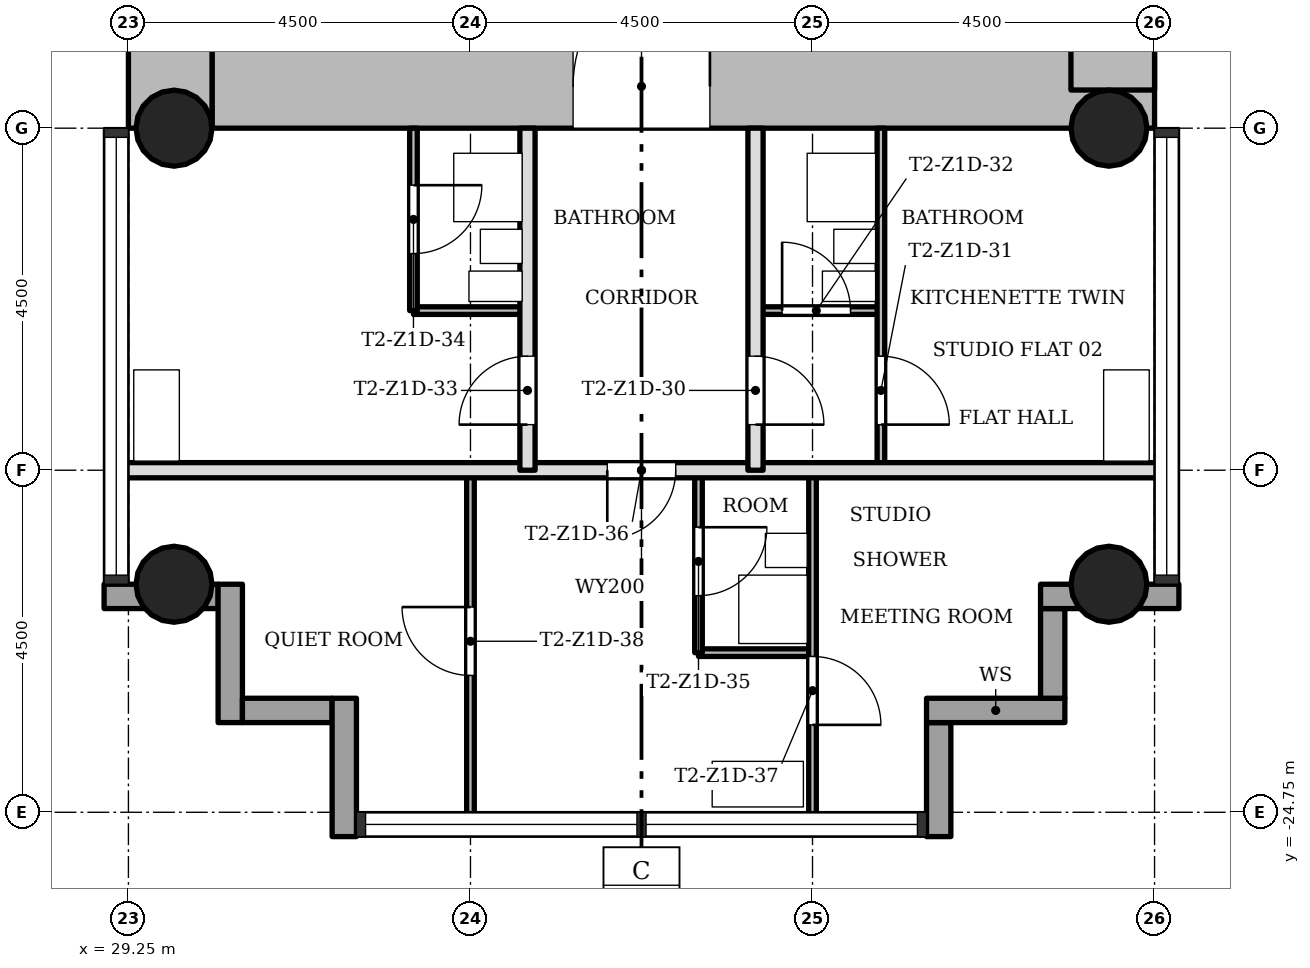
"""IFC4 building model, lengths in metres.
Left out: names, types, materials, properties, quantities, classifications, styles, units other than length and angle.
Written with IfcOpenShell. Run it as: python <this file> out.ifc"""

import sys

from ifc_helpers import new_model, si_unit, direction, frame, frame_2d, origin, origin_2d, place, context, subcontext, project, spatial, rectangle, hollow_circle, extrude, element, fill, save


model = new_model("IFC4")
c1 = context("Model", 3, precision=1e-05, world=origin(), true_north=direction((0.0, 1.0)))
c2 = subcontext(c1, "Body", "Model", "MODEL_VIEW")
j1 = project(units=[si_unit("LENGTHUNIT", "METRE"), si_unit("PLANEANGLEUNIT", "RADIAN")], contexts=[c1])
p1 = place(None, origin())
s1 = spatial("IfcSite", under=j1, at=p1, CompositionType="ELEMENT")
p2 = place(p1, origin())
s2 = spatial("IfcBuilding", under=s1, at=p2, CompositionType="ELEMENT")
p3 = place(p2, frame((0.0, 0.0, 61.9)))
s3 = spatial("IfcBuildingStorey", under=s2, at=p3, CompositionType="ELEMENT", Elevation=61.9)
p4 = place(p3, frame((30.35, -15.2, 0.0), z_axis=(0.0, 0.0, 1.0), x_axis=(1.0, 0.0, 0.0)))
e1 = element("IfcWall", 1, at=p4, inside=s3, PredefinedType="SHEAR", context=c2, shape_type="SweptSolid", body=[
    extrude(rectangle(XDim=12.4, YDim=1.1, at=frame_2d((6.2, 0.0))), origin(), (0.0, 0.0, 1.0), 3.4),
])
p5 = place(p4, frame((4.75, 0.0, 0.0)))
e2 = element("IfcOpeningElement", 2, at=p5, cuts=e1, PredefinedType="OPENING", context=c2, shape_type="SweptSolid", body=[
    extrude(rectangle(XDim=1.8, YDim=2.1, at=frame_2d((0.9, 1.05))), frame((0.0, 0.56, 0.0), z_axis=(0.0, -1.0, 0.0), x_axis=(1.0, 0.0, 0.0)), (0.0, 0.0, 1.0), 1.12),
])
p6 = place(p3, frame((42.2, -15.248, 0.0), z_axis=(0.0, 0.0, 1.0), x_axis=(0.0, 1.0, 0.0)))
e3 = element("IfcWall", 3, at=p6, inside=s3, PredefinedType="SHEAR", context=c2, shape_type="SweptSolid", body=[
    extrude(rectangle(XDim=8.596, YDim=1.1, at=frame_2d((4.298, 0.0))), origin(), (0.0, 0.0, 1.0), 3.4),
])
p7 = place(p3, frame((29.8, -7.85, 0.0), z_axis=(0.0, 0.0, 1.0), x_axis=(0.0, -1.0, 0.0)))
e4 = element("IfcWall", 4, at=p7, inside=s3, PredefinedType="SHEAR", context=c2, shape_type="SweptSolid", body=[
    extrude(rectangle(XDim=7.9, YDim=1.1, at=frame_2d((3.95, 0.0))), origin(), (0.0, 0.0, 1.0), 3.4),
])
for number, where, z_axis, x_axis in (
    (5, (42.15, -15.75, 0.0), (0.0, 0.0, 1.0), (1.0, 0.0, 0.0)),
    (6, (29.85, -15.75, 0.0), (0.0, 0.0, 1.0), (1.0, 0.0, 0.0)),
    (7, (42.15, -21.75, 0.0), (0.0, 0.0, 1.0), (1.0, 0.0, 0.0)),
    (8, (29.85, -21.75, 0.0), (0.0, 0.0, 1.0), (1.0, 0.0, 0.0)),
):
    element("IfcColumn", number, at=place(p3, frame(where, z_axis=z_axis, x_axis=x_axis)), inside=s3, PredefinedType="COLUMN", context=c2, shape_type="SweptSolid", body=[
        extrude(hollow_circle(Radius=0.5, WallThickness=0.036, at=origin_2d()), origin(), (0.0, 0.0, 1.0), 3.4),
    ])
p8 = place(p3, frame((39.91, -25.07, -0.3), z_axis=(0.0, 0.0, 1.0), x_axis=(0.0, 1.0, 0.0)))
e9 = element("IfcWall", 9, at=p8, inside=s3, PredefinedType="STANDARD", context=c2, shape_type="SweptSolid", body=[
    extrude(rectangle(XDim=1.5, YDim=0.32, at=frame_2d((0.75, 0.0))), origin(), (0.0, 0.0, 1.0), 3.4),
])
p9 = place(p3, frame((39.75, -23.41, -0.3), z_axis=(0.0, 0.0, 1.0), x_axis=(1.0, 0.0, 0.0)))
e10 = element("IfcWall", 10, at=p9, inside=s3, PredefinedType="STANDARD", context=c2, shape_type="SweptSolid", body=[
    extrude(rectangle(XDim=1.82, YDim=0.32, at=frame_2d((0.91, 0.0))), origin(), (0.0, 0.0, 1.0), 3.4),
])
p10 = place(p3, frame((41.41, -23.25, -0.3), z_axis=(0.0, 0.0, 1.0), x_axis=(0.0, 1.0, 0.0)))
e11 = element("IfcWall", 11, at=p10, inside=s3, PredefinedType="STANDARD", context=c2, shape_type="SweptSolid", body=[
    extrude(rectangle(XDim=1.18, YDim=0.32, at=frame_2d((0.59, 0.0))), origin(), (0.0, 0.0, 1.0), 3.4),
])
p11 = place(p3, frame((41.25, -21.91, -0.3), z_axis=(0.0, 0.0, 1.0), x_axis=(1.0, 0.0, 0.0)))
e12 = element("IfcWall", 12, at=p11, inside=s3, PredefinedType="STANDARD", context=c2, shape_type="SweptSolid", body=[
    extrude(rectangle(XDim=1.82, YDim=0.32, at=frame_2d((0.91, 0.0))), origin(), (0.0, 0.0, 1.0), 3.4),
])
p12 = place(p3, frame((28.93, -21.91, -0.3), z_axis=(0.0, 0.0, 1.0), x_axis=(1.0, 0.0, 0.0)))
e13 = element("IfcWall", 13, at=p12, inside=s3, PredefinedType="STANDARD", context=c2, shape_type="SweptSolid", body=[
    extrude(rectangle(XDim=1.5, YDim=0.32, at=frame_2d((0.75, 0.0))), origin(), (0.0, 0.0, 1.0), 3.4),
])
p13 = place(p3, frame((30.59, -21.75, -0.3), z_axis=(0.0, 0.0, 1.0), x_axis=(0.0, -1.0, 0.0)))
e14 = element("IfcWall", 14, at=p13, inside=s3, PredefinedType="STANDARD", context=c2, shape_type="SweptSolid", body=[
    extrude(rectangle(XDim=1.82, YDim=0.32, at=frame_2d((0.91, 0.0))), origin(), (0.0, 0.0, 1.0), 3.4),
])
p14 = place(p3, frame((30.75, -23.41, -0.3), z_axis=(0.0, 0.0, 1.0), x_axis=(1.0, 0.0, 0.0)))
e15 = element("IfcWall", 15, at=p14, inside=s3, PredefinedType="STANDARD", context=c2, shape_type="SweptSolid", body=[
    extrude(rectangle(XDim=1.18, YDim=0.32, at=frame_2d((0.59, 0.0))), origin(), (0.0, 0.0, 1.0), 3.4),
])
p15 = place(p3, frame((32.09, -23.25, -0.3), z_axis=(0.0, 0.0, 1.0), x_axis=(0.0, -1.0, 0.0)))
e16 = element("IfcWall", 16, at=p15, inside=s3, PredefinedType="STANDARD", context=c2, shape_type="SweptSolid", body=[
    extrude(rectangle(XDim=1.82, YDim=0.32, at=frame_2d((0.91, 0.0))), origin(), (0.0, 0.0, 1.0), 3.4),
])
p16 = place(p3, frame((38.25, -22.65, 0.0), z_axis=(0.0, 0.0, 1.0), x_axis=(-1.0, 0.0, 0.0)))
e17 = element("IfcWall", 17, at=p16, inside=s3, PredefinedType="PARTITIONING", context=c2, shape_type="SweptSolid", body=[
    extrude(rectangle(XDim=1.5, YDim=0.1, at=frame_2d((0.75, 0.0))), origin(), (0.0, 0.0, 1.0), 3.0),
])
p17 = place(p3, frame((42.85, -20.25, 0.0), z_axis=(0.0, 0.0, 1.0), x_axis=(-1.0, 0.0, 0.0)))
e18 = element("IfcWall", 18, at=p17, inside=s3, PredefinedType="SOLIDWALL", context=c2, shape_type="SweptSolid", body=[
    extrude(rectangle(XDim=13.7, YDim=0.2, at=frame_2d((6.85, 0.0))), origin(), (0.0, 0.0, 1.0), 3.0),
])
p18 = place(p17, frame((6.4, 0.0, 0.0)))
e19 = element("IfcOpeningElement", 19, at=p18, cuts=e18, PredefinedType="OPENING", context=c2, shape_type="SweptSolid", body=[
    extrude(rectangle(XDim=0.9, YDim=2.1, at=frame_2d((0.45, 1.05))), frame((0.0, 0.11, 0.0), z_axis=(0.0, -1.0, 0.0), x_axis=(1.0, 0.0, 0.0)), (0.0, 0.0, 1.0), 0.22),
])
p19 = place(p3, frame((39.15, -18.15, 0.0), z_axis=(0.0, 0.0, 1.0), x_axis=(-1.0, 0.0, 0.0)))
e20 = element("IfcWall", 20, at=p19, inside=s3, PredefinedType="PARTITIONING", context=c2, shape_type="SweptSolid", body=[
    extrude(rectangle(XDim=1.65, YDim=0.1, at=frame_2d((0.825, 0.0))), origin(), (0.0, 0.0, 1.0), 3.0),
])
p20 = place(p19, frame((0.4, 0.0, 0.0)))
e21 = element("IfcOpeningElement", 21, at=p20, cuts=e20, PredefinedType="OPENING", context=c2, shape_type="SweptSolid", body=[
    extrude(rectangle(XDim=0.9, YDim=2.1, at=frame_2d((0.45, 1.05))), frame((0.0, 0.06, 0.0), z_axis=(0.0, -1.0, 0.0), x_axis=(1.0, 0.0, 0.0)), (0.0, 0.0, 1.0), 0.12),
])
p21 = place(p3, frame((34.5, -18.15, 0.0), z_axis=(0.0, 0.0, 1.0), x_axis=(-1.0, 0.0, 0.0)))
e22 = element("IfcWall", 22, at=p21, inside=s3, PredefinedType="PARTITIONING", context=c2, shape_type="SweptSolid", body=[
    extrude(rectangle(XDim=1.5, YDim=0.1, at=frame_2d((0.75, 0.0))), origin(), (0.0, 0.0, 1.0), 3.0),
])
p22 = place(p3, frame((39.15, -20.25, 0.0), z_axis=(0.0, 0.0, 1.0), x_axis=(0.0, 1.0, 0.0)))
e23 = element("IfcWall", 23, at=p22, inside=s3, PredefinedType="PARTITIONING", context=c2, shape_type="SweptSolid", body=[
    extrude(rectangle(XDim=4.5, YDim=0.1, at=frame_2d((2.25, 0.0))), origin(), (0.0, 0.0, 1.0), 3.0),
])
p23 = place(p22, frame((0.6, 0.0, 0.0)))
e24 = element("IfcOpeningElement", 24, at=p23, cuts=e23, PredefinedType="OPENING", context=c2, shape_type="SweptSolid", body=[
    extrude(rectangle(XDim=0.9, YDim=2.1, at=frame_2d((0.45, 1.05))), frame((0.0, 0.06, 0.0), z_axis=(0.0, -1.0, 0.0), x_axis=(1.0, 0.0, 0.0)), (0.0, 0.0, 1.0), 0.12),
])
p24 = place(p3, frame((38.25, -24.85, 0.0), z_axis=(0.0, 0.0, 1.0), x_axis=(0.0, 1.0, 0.0)))
e25 = element("IfcWall", 25, at=p24, inside=s3, PredefinedType="PARTITIONING", context=c2, shape_type="SweptSolid", body=[
    extrude(rectangle(XDim=4.6, YDim=0.1, at=frame_2d((2.3, 0.0))), origin(), (0.0, 0.0, 1.0), 3.0),
])
p25 = place(p24, frame((1.25, 0.0, 0.0)))
e26 = element("IfcOpeningElement", 26, at=p25, cuts=e25, PredefinedType="OPENING", context=c2, shape_type="SweptSolid", body=[
    extrude(rectangle(XDim=0.9, YDim=2.1, at=frame_2d((0.45, 1.05))), frame((0.0, 0.06, 0.0), z_axis=(0.0, -1.0, 0.0), x_axis=(1.0, 0.0, 0.0)), (0.0, 0.0, 1.0), 0.12),
])
p26 = place(p3, frame((37.5, -20.25, 0.0), z_axis=(0.0, 0.0, 1.0), x_axis=(0.0, 1.0, 0.0)))
e27 = element("IfcWall", 27, at=p26, inside=s3, PredefinedType="SOLIDWALL", context=c2, shape_type="SweptSolid", body=[
    extrude(rectangle(XDim=4.5, YDim=0.2, at=frame_2d((2.25, 0.0))), origin(), (0.0, 0.0, 1.0), 3.0),
])
p27 = place(p26, frame((0.6, 0.0, 0.0)))
e28 = element("IfcOpeningElement", 28, at=p27, cuts=e27, PredefinedType="OPENING", context=c2, shape_type="SweptSolid", body=[
    extrude(rectangle(XDim=0.9, YDim=2.1, at=frame_2d((0.45, 1.05))), frame((0.0, 0.11, 0.0), z_axis=(0.0, -1.0, 0.0), x_axis=(1.0, 0.0, 0.0)), (0.0, 0.0, 1.0), 0.22),
])
p28 = place(p3, frame((36.75, -22.65, 0.0), z_axis=(0.0, 0.0, 1.0), x_axis=(0.0, 1.0, 0.0)))
e29 = element("IfcWall", 29, at=p28, inside=s3, PredefinedType="PARTITIONING", context=c2, shape_type="SweptSolid", body=[
    extrude(rectangle(XDim=2.4, YDim=0.1, at=frame_2d((1.2, 0.0))), origin(), (0.0, 0.0, 1.0), 3.0),
])
p29 = place(p28, frame((0.75, 0.0, 0.0)))
e30 = element("IfcOpeningElement", 30, at=p29, cuts=e29, PredefinedType="OPENING", context=c2, shape_type="SweptSolid", body=[
    extrude(rectangle(XDim=0.9, YDim=2.1, at=frame_2d((0.45, 1.05))), frame((0.0, 0.06, 0.0), z_axis=(0.0, -1.0, 0.0), x_axis=(1.0, 0.0, 0.0)), (0.0, 0.0, 1.0), 0.12),
])
p30 = place(p3, frame((34.5, -20.25, 0.0), z_axis=(0.0, 0.0, 1.0), x_axis=(0.0, 1.0, 0.0)))
e31 = element("IfcWall", 31, at=p30, inside=s3, PredefinedType="SOLIDWALL", context=c2, shape_type="SweptSolid", body=[
    extrude(rectangle(XDim=4.5, YDim=0.2, at=frame_2d((2.25, 0.0))), origin(), (0.0, 0.0, 1.0), 3.0),
])
p31 = place(p30, frame((0.6, 0.0, 0.0)))
e32 = element("IfcOpeningElement", 32, at=p31, cuts=e31, PredefinedType="OPENING", context=c2, shape_type="SweptSolid", body=[
    extrude(rectangle(XDim=0.9, YDim=2.1, at=frame_2d((0.45, 1.05))), frame((0.0, 0.11, 0.0), z_axis=(0.0, -1.0, 0.0), x_axis=(1.0, 0.0, 0.0)), (0.0, 0.0, 1.0), 0.22),
])
p32 = place(p3, frame((33.75, -24.85, 0.0), z_axis=(0.0, 0.0, 1.0), x_axis=(0.0, 1.0, 0.0)))
e33 = element("IfcWall", 33, at=p32, inside=s3, PredefinedType="PARTITIONING", context=c2, shape_type="SweptSolid", body=[
    extrude(rectangle(XDim=4.6, YDim=0.1, at=frame_2d((2.3, 0.0))), origin(), (0.0, 0.0, 1.0), 3.0),
])
p33 = place(p32, frame((1.9, 0.0, 0.0)))
e34 = element("IfcOpeningElement", 34, at=p33, cuts=e33, PredefinedType="OPENING", context=c2, shape_type="SweptSolid", body=[
    extrude(rectangle(XDim=0.9, YDim=2.1, at=frame_2d((0.45, 1.05))), frame((0.0, 0.06, 0.0), z_axis=(0.0, -1.0, 0.0), x_axis=(1.0, 0.0, 0.0)), (0.0, 0.0, 1.0), 0.12),
])
p34 = place(p3, frame((33.0, -18.15, 0.0), z_axis=(0.0, 0.0, 1.0), x_axis=(0.0, 1.0, 0.0)))
e35 = element("IfcWall", 35, at=p34, inside=s3, PredefinedType="PARTITIONING", context=c2, shape_type="SweptSolid", body=[
    extrude(rectangle(XDim=2.4, YDim=0.1, at=frame_2d((1.2, 0.0))), origin(), (0.0, 0.0, 1.0), 3.0),
])
p35 = place(p34, frame((0.75, 0.0, 0.0)))
e36 = element("IfcOpeningElement", 36, at=p35, cuts=e35, PredefinedType="OPENING", context=c2, shape_type="SweptSolid", body=[
    extrude(rectangle(XDim=0.9, YDim=2.1, at=frame_2d((0.45, 1.05))), frame((0.0, 0.06, 0.0), z_axis=(0.0, -1.0, 0.0), x_axis=(1.0, 0.0, 0.0)), (0.0, 0.0, 1.0), 0.12),
])
p36 = place(p27, origin())
e37 = element("IfcDoor", 37, at=p36, inside=s3, OperationType="SINGLE_SWING_LEFT", PredefinedType="DOOR", context=c2, shape_type="SweptSolid", body=[
    extrude(rectangle(XDim=0.9, YDim=2.1, at=frame_2d((0.45, 1.05))), frame((0.0, 0.025, 0.0), z_axis=(0.0, -1.0, 0.0), x_axis=(1.0, 0.0, 0.0)), (0.0, 0.0, 1.0), 0.05),
])
fill(e28, e37)
p37 = place(p23, origin())
e38 = element("IfcDoor", 38, at=p37, inside=s3, OperationType="SINGLE_SWING_LEFT", PredefinedType="DOOR", context=c2, shape_type="SweptSolid", body=[
    extrude(rectangle(XDim=0.9, YDim=2.1, at=frame_2d((0.45, 1.05))), frame((0.0, 0.025, 0.0), z_axis=(0.0, -1.0, 0.0), x_axis=(1.0, 0.0, 0.0)), (0.0, 0.0, 1.0), 0.05),
])
fill(e24, e38)
p38 = place(p20, origin())
e39 = element("IfcDoor", 39, at=p38, inside=s3, OperationType="SINGLE_SWING_RIGHT", PredefinedType="DOOR", context=c2, shape_type="SweptSolid", body=[
    extrude(rectangle(XDim=0.9, YDim=2.1, at=frame_2d((0.45, 1.05))), frame((0.0, 0.025, 0.0), z_axis=(0.0, -1.0, 0.0), x_axis=(1.0, 0.0, 0.0)), (0.0, 0.0, 1.0), 0.05),
])
fill(e21, e39)
p39 = place(p31, origin())
e40 = element("IfcDoor", 40, at=p39, inside=s3, OperationType="SINGLE_SWING_RIGHT", PredefinedType="DOOR", context=c2, shape_type="SweptSolid", body=[
    extrude(rectangle(XDim=0.9, YDim=2.1, at=frame_2d((0.45, 1.05))), frame((0.0, 0.025, 0.0), z_axis=(0.0, -1.0, 0.0), x_axis=(1.0, 0.0, 0.0)), (0.0, 0.0, 1.0), 0.05),
])
fill(e32, e40)
p40 = place(p35, origin())
e41 = element("IfcDoor", 41, at=p40, inside=s3, OperationType="SINGLE_SWING_RIGHT", PredefinedType="DOOR", context=c2, shape_type="SweptSolid", body=[
    extrude(rectangle(XDim=0.9, YDim=2.1, at=frame_2d((0.45, 1.05))), frame((0.0, 0.025, 0.0), z_axis=(0.0, -1.0, 0.0), x_axis=(1.0, 0.0, 0.0)), (0.0, 0.0, 1.0), 0.05),
])
fill(e36, e41)
p41 = place(p29, origin())
e42 = element("IfcDoor", 42, at=p41, inside=s3, OperationType="SINGLE_SWING_RIGHT", PredefinedType="DOOR", context=c2, shape_type="SweptSolid", body=[
    extrude(rectangle(XDim=0.9, YDim=2.1, at=frame_2d((0.45, 1.05))), frame((0.0, 0.025, 0.0), z_axis=(0.0, -1.0, 0.0), x_axis=(1.0, 0.0, 0.0)), (0.0, 0.0, 1.0), 0.05),
])
fill(e30, e42)
p42 = place(p18, origin())
e43 = element("IfcDoor", 43, at=p42, inside=s3, OperationType="SINGLE_SWING_LEFT", PredefinedType="DOOR", context=c2, shape_type="SweptSolid", body=[
    extrude(rectangle(XDim=0.9, YDim=2.1, at=frame_2d((0.45, 1.05))), frame((0.0, 0.025, 0.0), z_axis=(0.0, -1.0, 0.0), x_axis=(1.0, 0.0, 0.0)), (0.0, 0.0, 1.0), 0.05),
])
fill(e19, e43)
p43 = place(p25, origin())
e44 = element("IfcDoor", 44, at=p43, inside=s3, OperationType="SINGLE_SWING_LEFT", PredefinedType="DOOR", context=c2, shape_type="SweptSolid", body=[
    extrude(rectangle(XDim=0.9, YDim=2.1, at=frame_2d((0.45, 1.05))), frame((0.0, 0.025, 0.0), z_axis=(0.0, -1.0, 0.0), x_axis=(1.0, 0.0, 0.0)), (0.0, 0.0, 1.0), 0.05),
])
fill(e26, e44)
p44 = place(p33, origin())
e45 = element("IfcDoor", 45, at=p44, inside=s3, OperationType="SINGLE_SWING_LEFT", PredefinedType="DOOR", context=c2, shape_type="SweptSolid", body=[
    extrude(rectangle(XDim=0.9, YDim=2.1, at=frame_2d((0.45, 1.05))), frame((0.0, 0.025, 0.0), z_axis=(0.0, -1.0, 0.0), x_axis=(1.0, 0.0, 0.0)), (0.0, 0.0, 1.0), 0.05),
])
fill(e34, e45)
p45 = place(p5, origin())
e46 = element("IfcDoor", 46, at=p45, inside=s3, OperationType="SINGLE_SWING_LEFT", PredefinedType="DOOR", context=c2, shape_type="SweptSolid", body=[
    extrude(rectangle(XDim=1.8, YDim=2.1, at=frame_2d((0.9, 1.05))), frame((0.0, 0.025, 0.0), z_axis=(0.0, -1.0, 0.0), x_axis=(1.0, 0.0, 0.0)), (0.0, 0.0, 1.0), 0.05),
])
fill(e2, e46)
save(model, sys.argv[1])
